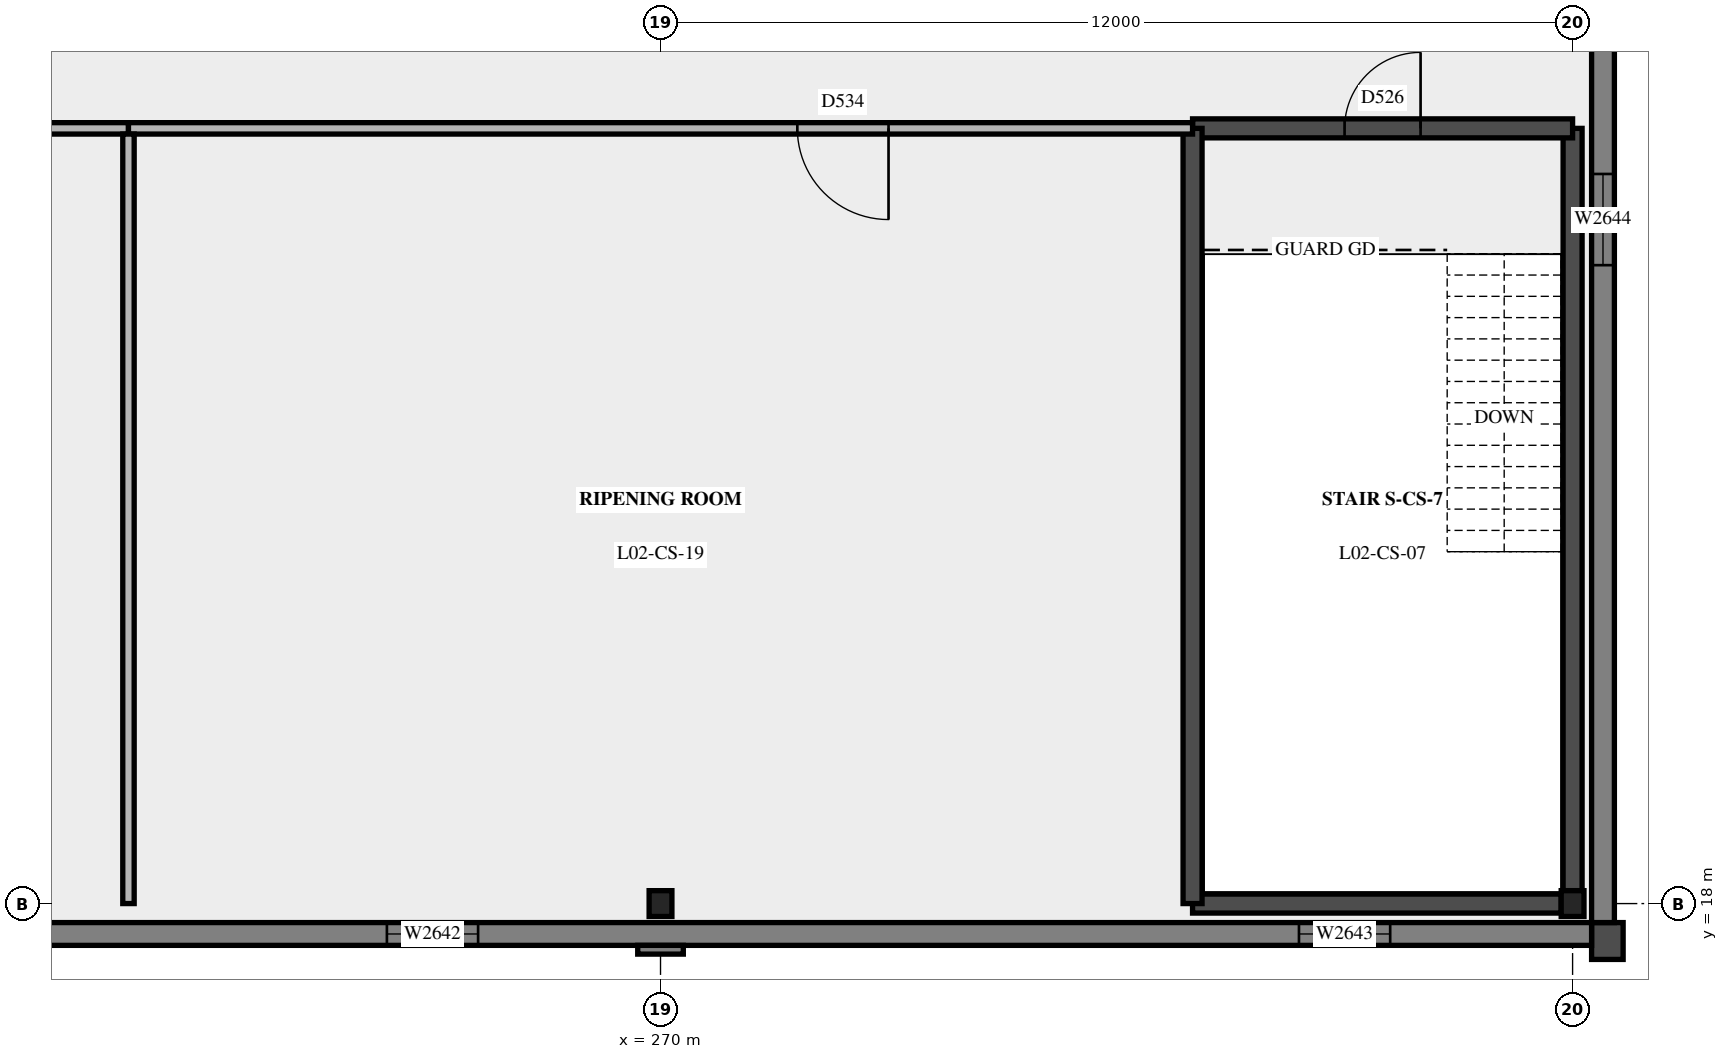
"""IFC4 building model, lengths in metres.
Left out: names, types, materials, properties, quantities, classifications, styles, units other than length and angle.
Written with IfcOpenShell. Run it as: python <this file> out.ifc"""

import sys

from ifc_helpers import new_model, si_unit, direction, frame, frame_2d, origin, origin_2d, place, context, subcontext, project, spatial, polyline, rectangle, i_section, outline, extrude, element, fill, save


model = new_model("IFC4")
c1 = context("Model", 3, precision=1e-05, world=origin(), true_north=direction((0.0, 1.0)))
c2 = subcontext(c1, "Body", "Model", "MODEL_VIEW")
j1 = project(units=[si_unit("LENGTHUNIT", "METRE"), si_unit("PLANEANGLEUNIT", "RADIAN")], contexts=[c1])
p1 = place(None, origin())
s1 = spatial("IfcSite", under=j1, at=p1, CompositionType="ELEMENT")
p2 = place(p1, origin())
s2 = spatial("IfcBuilding", under=s1, at=p2, CompositionType="ELEMENT")
p3 = place(p2, frame((0.0, 0.0, 10.8)))
s3 = spatial("IfcBuildingStorey", under=s2, at=p3, CompositionType="ELEMENT", Elevation=10.8)
for number, where, z_axis, x_axis in (
    (1, (270.0, 18.0, 0.0), (0.0, 0.0, 1.0), (1.0, 0.0, 0.0)),
    (2, (282.0, 18.0, 0.0), (0.0, 0.0, 1.0), (1.0, 0.0, 0.0)),
):
    element("IfcColumn", number, at=place(p3, frame(where, z_axis=z_axis, x_axis=x_axis)), inside=s3, PredefinedType="COLUMN", context=c2, shape_type="SweptSolid", body=[
        extrude(i_section(OverallWidth=0.3, OverallDepth=0.34, WebThickness=0.012, FlangeThickness=0.021, at=origin_2d()), origin(), (0.0, 0.0, 1.0), 5.4),
    ])
p4 = place(p3, frame((277.0, 18.0, 0.0), z_axis=(0.0, 0.0, 1.0), x_axis=(1.0, 0.0, 0.0)))
e3 = element("IfcWall", 3, at=p4, inside=s3, PredefinedType="SHEAR", context=c2, shape_type="SweptSolid", body=[
    extrude(rectangle(XDim=4.85, YDim=0.25, at=frame_2d((2.425, 0.0))), origin(), (0.0, 0.0, 1.0), 5.15),
])
p5 = place(p3, frame((282.0, 18.17, 0.0), z_axis=(0.0, 0.0, 1.0), x_axis=(0.0, 1.0, 0.0)))
e4 = element("IfcWall", 4, at=p5, inside=s3, PredefinedType="SHEAR", context=c2, shape_type="SweptSolid", body=[
    extrude(rectangle(XDim=10.03, YDim=0.25, at=frame_2d((5.015, 0.0))), origin(), (0.0, 0.0, 1.0), 5.15),
])
p6 = place(p3, frame((277.0, 28.2, 0.0), z_axis=(0.0, 0.0, 1.0), x_axis=(1.0, 0.0, 0.0)))
e5 = element("IfcWall", 5, at=p6, inside=s3, PredefinedType="SHEAR", context=c2, shape_type="SweptSolid", body=[
    extrude(rectangle(XDim=5.0, YDim=0.25, at=frame_2d((2.5, 0.0))), origin(), (0.0, 0.0, 1.0), 5.15),
])
p7 = place(p6, frame((2.0, 0.0, 0.0)))
e6 = element("IfcOpeningElement", 6, at=p7, cuts=e5, PredefinedType="OPENING", context=c2, shape_type="SweptSolid", body=[
    extrude(rectangle(XDim=1.0, YDim=2.1, at=frame_2d((0.5, 1.05))), frame((0.0, 0.135, 0.0), z_axis=(0.0, -1.0, 0.0), x_axis=(1.0, 0.0, 0.0)), (0.0, 0.0, 1.0), 0.27),
])
p8 = place(p3, frame((277.0, 18.0, 0.0), z_axis=(0.0, 0.0, 1.0), x_axis=(0.0, 1.0, 0.0)))
e7 = element("IfcWall", 7, at=p8, inside=s3, PredefinedType="SHEAR", context=c2, shape_type="SweptSolid", body=[
    extrude(rectangle(XDim=10.2, YDim=0.25, at=frame_2d((5.1, 0.0))), origin(), (0.0, 0.0, 1.0), 5.15),
])
p9 = place(p3, frame((282.25, 17.508, 0.0), z_axis=(0.0, 0.0, 1.0), x_axis=(1.0, 0.0, 0.0)))
e8 = element("IfcWall", 8, at=p9, inside=s3, PredefinedType="SOLIDWALL", context=c2, shape_type="SweptSolid", body=[
    extrude(rectangle(XDim=0.415, YDim=0.485, at=frame_2d((0.208, 0.0))), origin(), (0.0, 0.0, 1.0), 5.01),
])
p10 = place(p3, frame((282.25, 17.472, 5.01), z_axis=(0.0, 0.0, 1.0), x_axis=(1.0, 0.0, 0.0)))
e9 = element("IfcWall", 9, at=p10, inside=s3, PredefinedType="SOLIDWALL", context=c2, shape_type="SweptSolid", body=[
    extrude(rectangle(XDim=0.53, YDim=0.555, at=frame_2d((0.265, 0.0))), origin(), (0.0, 0.0, 1.0), 0.13),
])
p11 = place(p3, frame((282.25, 17.438, 5.14), z_axis=(0.0, 0.0, 1.0), x_axis=(1.0, 0.0, 0.0)))
e10 = element("IfcWall", 10, at=p11, inside=s3, PredefinedType="SOLIDWALL", context=c2, shape_type="SweptSolid", body=[
    extrude(rectangle(XDim=0.645, YDim=0.625, at=frame_2d((0.323, 0.0))), origin(), (0.0, 0.0, 1.0), 0.13),
])
p12 = place(p3, frame((282.25, 17.403, 5.27), z_axis=(0.0, 0.0, 1.0), x_axis=(1.0, 0.0, 0.0)))
e11 = element("IfcWall", 11, at=p12, inside=s3, PredefinedType="SOLIDWALL", context=c2, shape_type="SweptSolid", body=[
    extrude(rectangle(XDim=0.76, YDim=0.695, at=frame_2d((0.38, 0.0))), origin(), (0.0, 0.0, 1.0), 0.13),
])
p13 = place(p3, frame((197.75, 17.6, 0.0), z_axis=(0.0, 0.0, 1.0), x_axis=(1.0, 0.0, 0.0)))
e12 = element("IfcWall", 12, at=p13, inside=s3, PredefinedType="SOLIDWALL", context=c2, shape_type="SweptSolid", body=[
    extrude(rectangle(XDim=84.5, YDim=0.3, at=frame_2d((42.25, 0.0))), origin(), (0.0, 0.0, 1.0), 5.4),
])
p14 = place(p13, frame((8.65, 0.0, 1.2)))
e13 = element("IfcOpeningElement", 13, at=p14, cuts=e12, PredefinedType="OPENING", context=c2, shape_type="SweptSolid", body=[
    extrude(rectangle(XDim=1.2, YDim=1.5, at=frame_2d((0.6, 0.75))), frame((0.0, 0.16, 0.0), z_axis=(0.0, -1.0, 0.0), x_axis=(1.0, 0.0, 0.0)), (0.0, 0.0, 1.0), 0.32),
])
p15 = place(p13, frame((20.65, 0.0, 1.2)))
e14 = element("IfcOpeningElement", 14, at=p15, cuts=e12, PredefinedType="OPENING", context=c2, shape_type="SweptSolid", body=[
    extrude(rectangle(XDim=1.2, YDim=1.5, at=frame_2d((0.6, 0.75))), frame((0.0, 0.16, 0.0), z_axis=(0.0, -1.0, 0.0), x_axis=(1.0, 0.0, 0.0)), (0.0, 0.0, 1.0), 0.32),
])
p16 = place(p13, frame((32.65, 0.0, 1.2)))
e15 = element("IfcOpeningElement", 15, at=p16, cuts=e12, PredefinedType="OPENING", context=c2, shape_type="SweptSolid", body=[
    extrude(rectangle(XDim=1.2, YDim=1.5, at=frame_2d((0.6, 0.75))), frame((0.0, 0.16, 0.0), z_axis=(0.0, -1.0, 0.0), x_axis=(1.0, 0.0, 0.0)), (0.0, 0.0, 1.0), 0.32),
])
p17 = place(p13, frame((44.65, 0.0, 1.2)))
e16 = element("IfcOpeningElement", 16, at=p17, cuts=e12, PredefinedType="OPENING", context=c2, shape_type="SweptSolid", body=[
    extrude(rectangle(XDim=1.2, YDim=1.5, at=frame_2d((0.6, 0.75))), frame((0.0, 0.16, 0.0), z_axis=(0.0, -1.0, 0.0), x_axis=(1.0, 0.0, 0.0)), (0.0, 0.0, 1.0), 0.32),
])
p18 = place(p13, frame((56.65, 0.0, 1.2)))
e17 = element("IfcOpeningElement", 17, at=p18, cuts=e12, PredefinedType="OPENING", context=c2, shape_type="SweptSolid", body=[
    extrude(rectangle(XDim=1.2, YDim=1.5, at=frame_2d((0.6, 0.75))), frame((0.0, 0.16, 0.0), z_axis=(0.0, -1.0, 0.0), x_axis=(1.0, 0.0, 0.0)), (0.0, 0.0, 1.0), 0.32),
])
p19 = place(p13, frame((68.65, 0.0, 1.2)))
e18 = element("IfcOpeningElement", 18, at=p19, cuts=e12, PredefinedType="OPENING", context=c2, shape_type="SweptSolid", body=[
    extrude(rectangle(XDim=1.2, YDim=1.5, at=frame_2d((0.6, 0.75))), frame((0.0, 0.16, 0.0), z_axis=(0.0, -1.0, 0.0), x_axis=(1.0, 0.0, 0.0)), (0.0, 0.0, 1.0), 0.32),
])
p20 = place(p13, frame((80.65, 0.0, 1.2)))
e19 = element("IfcOpeningElement", 19, at=p20, cuts=e12, PredefinedType="OPENING", context=c2, shape_type="SweptSolid", body=[
    extrude(rectangle(XDim=1.2, YDim=1.5, at=frame_2d((0.6, 0.75))), frame((0.0, 0.16, 0.0), z_axis=(0.0, -1.0, 0.0), x_axis=(1.0, 0.0, 0.0)), (0.0, 0.0, 1.0), 0.32),
])
p21 = place(p3, frame((269.7, 17.393, 0.0), z_axis=(0.0, 0.0, 1.0), x_axis=(1.0, 0.0, 0.0)))
e20 = element("IfcWall", 20, at=p21, inside=s3, PredefinedType="SOLIDWALL", context=c2, shape_type="SweptSolid", body=[
    extrude(rectangle(XDim=0.6, YDim=0.115, at=frame_2d((0.3, 0.0))), origin(), (0.0, 0.0, 1.0), 5.4),
])
p22 = place(p3, frame((282.4, 17.75, 0.0), z_axis=(0.0, 0.0, 1.0), x_axis=(0.0, 1.0, 0.0)))
e21 = element("IfcWall", 21, at=p22, inside=s3, PredefinedType="SOLIDWALL", context=c2, shape_type="SweptSolid", body=[
    extrude(rectangle(XDim=48.5, YDim=0.3, at=frame_2d((24.25, 0.0))), origin(), (0.0, 0.0, 1.0), 5.4),
])
p23 = place(p22, frame((8.65, 0.0, 1.2)))
e22 = element("IfcOpeningElement", 22, at=p23, cuts=e21, PredefinedType="OPENING", context=c2, shape_type="SweptSolid", body=[
    extrude(rectangle(XDim=1.2, YDim=1.5, at=frame_2d((0.6, 0.75))), frame((0.0, 0.16, 0.0), z_axis=(0.0, -1.0, 0.0), x_axis=(1.0, 0.0, 0.0)), (0.0, 0.0, 1.0), 0.32),
])
p24 = place(p22, frame((20.65, 0.0, 1.2)))
e23 = element("IfcOpeningElement", 23, at=p24, cuts=e21, PredefinedType="OPENING", context=c2, shape_type="SweptSolid", body=[
    extrude(rectangle(XDim=1.2, YDim=1.5, at=frame_2d((0.6, 0.75))), frame((0.0, 0.16, 0.0), z_axis=(0.0, -1.0, 0.0), x_axis=(1.0, 0.0, 0.0)), (0.0, 0.0, 1.0), 0.32),
])
p25 = place(p22, frame((32.65, 0.0, 1.2)))
e24 = element("IfcOpeningElement", 24, at=p25, cuts=e21, PredefinedType="OPENING", context=c2, shape_type="SweptSolid", body=[
    extrude(rectangle(XDim=1.2, YDim=1.5, at=frame_2d((0.6, 0.75))), frame((0.0, 0.16, 0.0), z_axis=(0.0, -1.0, 0.0), x_axis=(1.0, 0.0, 0.0)), (0.0, 0.0, 1.0), 0.32),
])
p26 = place(p22, frame((44.65, 0.0, 1.2)))
e25 = element("IfcOpeningElement", 25, at=p26, cuts=e21, PredefinedType="OPENING", context=c2, shape_type="SweptSolid", body=[
    extrude(rectangle(XDim=1.2, YDim=1.5, at=frame_2d((0.6, 0.75))), frame((0.0, 0.16, 0.0), z_axis=(0.0, -1.0, 0.0), x_axis=(1.0, 0.0, 0.0)), (0.0, 0.0, 1.0), 0.32),
])
p27 = place(p3, frame((239.0, 28.2, 0.0), z_axis=(0.0, 0.0, 1.0), x_axis=(1.0, 0.0, 0.0)))
e26 = element("IfcWall", 26, at=p27, inside=s3, PredefinedType="PARTITIONING", context=c2, shape_type="SweptSolid", body=[
    extrude(outline(polyline([(0.0, 0.0), (24.0, 0.0), (24.0, 5.15), (23.905, 5.15), (23.9, 4.63), (23.7, 4.63), (23.695, 5.15), (21.505, 5.15), (21.5, 4.63), (21.3, 4.63), (21.295, 5.15), (19.1, 5.15), (19.095, 4.68), (18.905, 4.68), (18.9, 5.15), (16.705, 5.15), (16.7, 4.63), (16.5, 4.63), (16.495, 5.15), (14.305, 5.15), (14.3, 4.63), (14.1, 4.63), (14.095, 5.15), (11.905, 5.15), (11.9, 4.63), (11.7, 4.63), (11.695, 5.15), (9.505, 5.15), (9.5, 4.63), (9.3, 4.63), (9.295, 5.15), (7.1, 5.15), (7.095, 4.68), (6.905, 4.68), (6.9, 5.15), (4.705, 5.15), (4.7, 4.63), (4.5, 4.63), (4.495, 5.15), (2.305, 5.15), (2.3, 4.63), (2.1, 4.63), (2.095, 5.15), (0.0, 5.15), (0.0, 0.0)])), frame((0.0, 0.075, 0.0), z_axis=(0.0, -1.0, 0.0), x_axis=(1.0, 0.0, 0.0)), (0.0, 0.0, 1.0), 0.15),
])
p28 = place(p27, frame((11.4, 0.0, 0.0)))
e27 = element("IfcOpeningElement", 27, at=p28, cuts=e26, PredefinedType="OPENING", context=c2, shape_type="SweptSolid", body=[
    extrude(rectangle(XDim=1.2, YDim=2.4, at=frame_2d((0.6, 1.2))), frame((0.0, 0.085, 0.0), z_axis=(0.0, -1.0, 0.0), x_axis=(1.0, 0.0, 0.0)), (0.0, 0.0, 1.0), 0.17),
])
p29 = place(p3, frame((263.0, 28.2, 0.0), z_axis=(0.0, 0.0, 1.0), x_axis=(1.0, 0.0, 0.0)))
e28 = element("IfcWall", 28, at=p29, inside=s3, PredefinedType="PARTITIONING", context=c2, shape_type="SweptSolid", body=[
    extrude(outline(polyline([(0.0, 0.0), (14.0, 0.0), (14.0, 5.15), (11.905, 5.15), (11.9, 4.63), (11.7, 4.63), (11.695, 5.15), (9.505, 5.15), (9.5, 4.63), (9.3, 4.63), (9.295, 5.15), (7.1, 5.15), (7.095, 4.68), (6.905, 4.68), (6.9, 5.15), (4.705, 5.15), (4.7, 4.63), (4.5, 4.63), (4.495, 5.15), (2.305, 5.15), (2.3, 4.63), (2.1, 4.63), (2.095, 5.15), (0.0, 5.15), (0.0, 0.0)])), frame((0.0, 0.075, 0.0), z_axis=(0.0, -1.0, 0.0), x_axis=(1.0, 0.0, 0.0)), (0.0, 0.0, 1.0), 0.15),
])
p30 = place(p29, frame((8.8, 0.0, 0.0)))
e29 = element("IfcOpeningElement", 29, at=p30, cuts=e28, PredefinedType="OPENING", context=c2, shape_type="SweptSolid", body=[
    extrude(rectangle(XDim=1.2, YDim=2.4, at=frame_2d((0.6, 1.2))), frame((0.0, 0.085, 0.0), z_axis=(0.0, -1.0, 0.0), x_axis=(1.0, 0.0, 0.0)), (0.0, 0.0, 1.0), 0.17),
])
p31 = place(p3, frame((263.0, 18.0, 0.0), z_axis=(0.0, 0.0, 1.0), x_axis=(0.0, 1.0, 0.0)))
e30 = element("IfcWall", 30, at=p31, inside=s3, PredefinedType="PARTITIONING", context=c2, shape_type="SweptSolid", body=[
    extrude(outline(polyline([(0.0, 0.0), (10.125, 0.0), (10.125, 5.15), (0.105, 5.15), (0.1, 4.63), (0.0, 4.63), (0.0, 0.0)])), frame((0.0, 0.075, 0.0), z_axis=(0.0, -1.0, 0.0), x_axis=(1.0, 0.0, 0.0)), (0.0, 0.0, 1.0), 0.15),
])
p32 = place(p19, origin())
e31 = element("IfcWindow", 31, at=p32, inside=s3, PartitioningType="SINGLE_PANEL", PredefinedType="WINDOW", context=c2, shape_type="SweptSolid", body=[
    extrude(rectangle(XDim=1.2, YDim=1.5, at=frame_2d((0.6, 0.75))), frame((0.0, 0.03, 0.0), z_axis=(0.0, -1.0, 0.0), x_axis=(1.0, 0.0, 0.0)), (0.0, 0.0, 1.0), 0.06),
])
fill(e18, e31)
p33 = place(p20, origin())
e32 = element("IfcWindow", 32, at=p33, inside=s3, PartitioningType="SINGLE_PANEL", PredefinedType="WINDOW", context=c2, shape_type="SweptSolid", body=[
    extrude(rectangle(XDim=1.2, YDim=1.5, at=frame_2d((0.6, 0.75))), frame((0.0, 0.03, 0.0), z_axis=(0.0, -1.0, 0.0), x_axis=(1.0, 0.0, 0.0)), (0.0, 0.0, 1.0), 0.06),
])
fill(e19, e32)
p34 = place(p23, origin())
e33 = element("IfcWindow", 33, at=p34, inside=s3, PartitioningType="SINGLE_PANEL", PredefinedType="WINDOW", context=c2, shape_type="SweptSolid", body=[
    extrude(rectangle(XDim=1.2, YDim=1.5, at=frame_2d((0.6, 0.75))), frame((0.0, 0.03, 0.0), z_axis=(0.0, -1.0, 0.0), x_axis=(1.0, 0.0, 0.0)), (0.0, 0.0, 1.0), 0.06),
])
fill(e22, e33)
p35 = place(p7, origin())
e34 = element("IfcDoor", 34, at=p35, inside=s3, OperationType="SINGLE_SWING_RIGHT", PredefinedType="DOOR", context=c2, shape_type="SweptSolid", body=[
    extrude(rectangle(XDim=1.0, YDim=2.1, at=frame_2d((0.5, 1.05))), frame((0.0, 0.025, 0.0), z_axis=(0.0, -1.0, 0.0), x_axis=(1.0, 0.0, 0.0)), (0.0, 0.0, 1.0), 0.05),
])
fill(e6, e34)
p36 = place(p30, origin())
e35 = element("IfcDoor", 35, at=p36, inside=s3, OperationType="SINGLE_SWING_LEFT", PredefinedType="DOOR", context=c2, shape_type="SweptSolid", body=[
    extrude(rectangle(XDim=1.2, YDim=2.4, at=frame_2d((0.6, 1.2))), frame((0.0, 0.025, 0.0), z_axis=(0.0, -1.0, 0.0), x_axis=(1.0, 0.0, 0.0)), (0.0, 0.0, 1.0), 0.05),
])
fill(e29, e35)
save(model, sys.argv[1])
